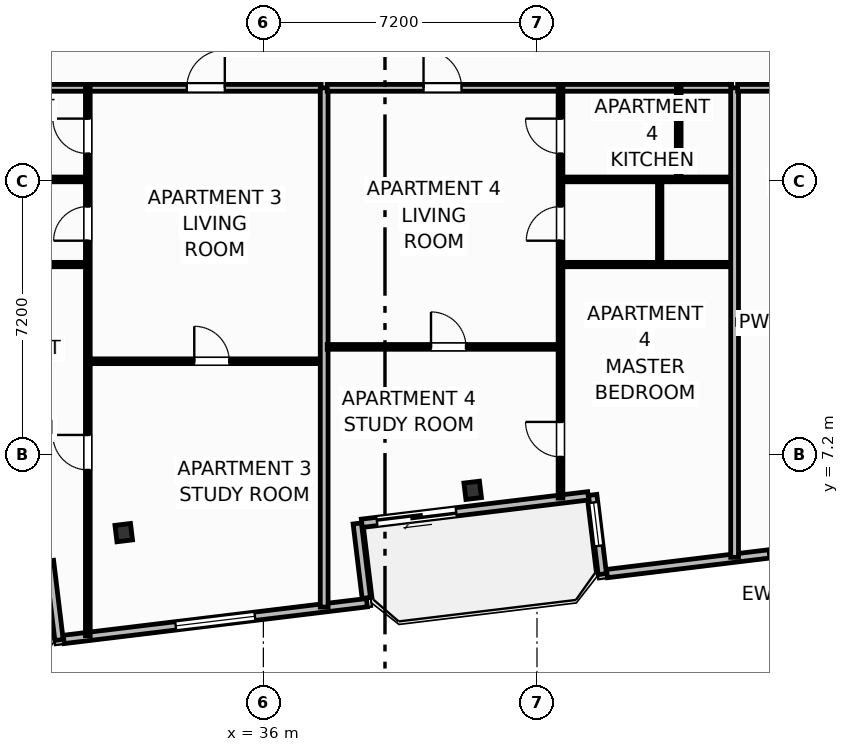
"""IFC4 building model, lengths in metres.
Left out: names, types, materials, properties, quantities, classifications, styles, units other than length and angle.
Written with IfcOpenShell. Run it as: python <this file> out.ifc"""

import sys

from ifc_helpers import new_model, si_unit, direction, frame, frame_2d, origin, origin_2d, place, context, subcontext, project, spatial, rectangle, i_section, extrude, element, fill, save


model = new_model("IFC4")
c1 = context("Model", 3, precision=1e-05, world=origin(), true_north=direction((0.0, 1.0)))
c2 = subcontext(c1, "Body", "Model", "MODEL_VIEW")
j1 = project(units=[si_unit("LENGTHUNIT", "METRE"), si_unit("PLANEANGLEUNIT", "RADIAN")], contexts=[c1])
p1 = place(None, origin())
s1 = spatial("IfcSite", under=j1, at=p1, CompositionType="ELEMENT")
p2 = place(p1, origin())
s2 = spatial("IfcBuilding", under=s1, at=p2, CompositionType="ELEMENT")
p3 = place(p2, frame((0.0, 0.0, 167.2)))
s3 = spatial("IfcBuildingStorey", under=s2, at=p3, CompositionType="ELEMENT", Elevation=167.2)
for number, where, z_axis, x_axis in (
    (1, (32.325, 5.146, 0.0), (0.0, 0.0, 1.0), (0.993, 0.12, 0.0)),
    (2, (41.508, 6.26, 0.0), (0.0, 0.0, 1.0), (0.993, 0.12, 0.0)),
):
    element("IfcColumn", number, at=place(p3, frame(where, z_axis=z_axis, x_axis=x_axis)), inside=s3, PredefinedType="COLUMN", context=c2, shape_type="SweptSolid", body=[
        extrude(i_section(OverallWidth=0.412, OverallDepth=0.435, WebThickness=0.036, FlangeThickness=0.057, FilletRadius=0.025, at=origin_2d()), origin(), (0.0, 0.0, 1.0), 3.7),
    ])
p4 = place(p3, frame((44.548, 6.114, 0.0), z_axis=(0.0, 0.0, 1.0), x_axis=(-0.992735402148, -0.120318000826, 0.0)))
e3 = element("IfcWall", 3, at=p4, inside=s3, PredefinedType="SOLIDWALL", context=c2, shape_type="SweptSolid", body=[
    extrude(rectangle(XDim=6.0, YDim=0.22, at=frame_2d((3.0, 0.0))), origin(), (0.0, 0.0, 1.0), 2.73),
])
p5 = place(p4, frame((3.5, 0.0, 0.0)))
e4 = element("IfcOpeningElement", 4, at=p5, cuts=e3, PredefinedType="OPENING", context=c2, shape_type="SweptSolid", body=[
    extrude(rectangle(XDim=2.1, YDim=2.3, at=frame_2d((1.05, 1.15))), frame((0.0, 0.12, 0.0), z_axis=(0.0, -1.0, 0.0), x_axis=(1.0, 0.0, 0.0)), (0.0, 0.0, 1.0), 0.24),
])
p6 = place(p3, frame((30.37, 4.406, 0.0), z_axis=(0.0, 0.0, 1.0), x_axis=(0.120327895535, -0.992734202874, 0.0)))
e5 = element("IfcWall", 5, at=p6, inside=s3, PredefinedType="SOLIDWALL", context=c2, shape_type="SweptSolid", body=[
    extrude(rectangle(XDim=2.1, YDim=0.22, at=frame_2d((1.05, 0.0))), origin(), (0.0, 0.0, 1.0), 2.73),
])
p7 = place(p3, frame((30.747, 2.336, 0.0), z_axis=(0.0, 0.0, 1.0), x_axis=(0.992731032022, 0.120354052946, 0.0)))
e6 = element("IfcWall", 6, at=p7, inside=s3, PredefinedType="SOLIDWALL", context=c2, shape_type="SweptSolid", body=[
    extrude(rectangle(XDim=8.035, YDim=0.22, at=frame_2d((4.018, 0.0))), origin(), (0.0, 0.0, 1.0), 2.73),
])
p8 = place(p7, frame((2.968, 0.0, 0.8)))
e7 = element("IfcOpeningElement", 7, at=p8, cuts=e6, PredefinedType="OPENING", context=c2, shape_type="SweptSolid", body=[
    extrude(rectangle(XDim=2.1, YDim=1.75, at=frame_2d((1.05, 0.875))), frame((0.0, 0.12, 0.0), z_axis=(0.0, -1.0, 0.0), x_axis=(1.0, 0.0, 0.0)), (0.0, 0.0, 1.0), 0.24),
])
p9 = place(p3, frame((38.709, 3.427, 0.0), z_axis=(0.0, 0.0, 1.0), x_axis=(-0.120397815541, 0.992725725472, 0.0)))
e8 = element("IfcWall", 8, at=p9, inside=s3, PredefinedType="SOLIDWALL", context=c2, shape_type="SweptSolid", body=[
    extrude(rectangle(XDim=1.975, YDim=0.22, at=frame_2d((0.988, 0.0))), origin(), (0.0, 0.0, 1.0), 2.73),
])
p10 = place(p3, frame((44.666, 6.138, 0.0), z_axis=(0.0, 0.0, 1.0), x_axis=(0.120327895535, -0.992734202874, 0.0)))
e9 = element("IfcWall", 9, at=p10, inside=s3, PredefinedType="SOLIDWALL", context=c2, shape_type="SweptSolid", body=[
    extrude(rectangle(XDim=2.1, YDim=0.22, at=frame_2d((1.05, 0.0))), origin(), (0.0, 0.0, 1.0), 2.73),
])
p11 = place(p10, frame((0.2, 0.0, 0.8)))
e10 = element("IfcOpeningElement", 10, at=p11, cuts=e9, PredefinedType="OPENING", context=c2, shape_type="SweptSolid", body=[
    extrude(rectangle(XDim=1.15, YDim=1.4, at=frame_2d((0.575, 0.7))), frame((0.0, 0.12, 0.0), z_axis=(0.0, -1.0, 0.0), x_axis=(1.0, 0.0, 0.0)), (0.0, 0.0, 1.0), 0.24),
])
p12 = place(p3, frame((45.042, 4.069, 0.0), z_axis=(0.0, 0.0, 1.0), x_axis=(0.992731032022, 0.120354052946, 0.0)))
e11 = element("IfcWall", 11, at=p12, inside=s3, PredefinedType="SOLIDWALL", context=c2, shape_type="SweptSolid", body=[
    extrude(rectangle(XDim=8.035, YDim=0.22, at=frame_2d((4.018, 0.0))), origin(), (0.0, 0.0, 1.0), 2.73),
])
p13 = place(p12, frame((4.273, 0.0, 0.8)))
e12 = element("IfcOpeningElement", 12, at=p13, cuts=e11, PredefinedType="OPENING", context=c2, shape_type="SweptSolid", body=[
    extrude(rectangle(XDim=2.1, YDim=1.75, at=frame_2d((1.05, 0.875))), frame((0.0, 0.12, 0.0), z_axis=(0.0, -1.0, 0.0), x_axis=(1.0, 0.0, 0.0)), (0.0, 0.0, 1.0), 0.24),
])
p14 = place(p3, frame((31.451, 9.656, 0.0), z_axis=(0.0, 0.0, 1.0), x_axis=(1.0, 0.0, 0.0)))
e13 = element("IfcWall", 13, at=p14, inside=s3, PredefinedType="PARTITIONING", context=c2, shape_type="SweptSolid", body=[
    extrude(rectangle(XDim=6.069, YDim=0.125, at=frame_2d((3.035, 0.0))), origin(), (0.0, 0.0, 1.0), 3.45),
])
p15 = place(p14, frame((2.731, 0.0, 0.0)))
e14 = element("IfcOpeningElement", 14, at=p15, cuts=e13, PredefinedType="OPENING", context=c2, shape_type="SweptSolid", body=[
    extrude(rectangle(XDim=0.92, YDim=2.05, at=frame_2d((0.46, 1.025))), frame((0.0, 0.073, 0.0), z_axis=(0.0, -1.0, 0.0), x_axis=(1.0, 0.0, 0.0)), (0.0, 0.0, 1.0), 0.145),
])
p16 = place(p3, frame((26.88, 16.85, 0.0), z_axis=(0.0, 0.0, 1.0), x_axis=(1.0, 0.0, 0.0)))
e15 = element("IfcWall", 15, at=p16, inside=s3, PredefinedType="PARTITIONING", context=c2, shape_type="SweptSolid", body=[
    extrude(rectangle(XDim=10.64, YDim=0.18, at=frame_2d((5.32, 0.0))), origin(), (0.0, 0.0, 1.0), 3.45),
])
p17 = place(p16, frame((7.105, 0.0, 0.0)))
e16 = element("IfcOpeningElement", 16, at=p17, cuts=e15, PredefinedType="OPENING", context=c2, shape_type="SweptSolid", body=[
    extrude(rectangle(XDim=1.0, YDim=2.2, at=frame_2d((0.5, 1.1))), frame((0.0, 0.1, 0.0), z_axis=(0.0, -1.0, 0.0), x_axis=(1.0, 0.0, 0.0)), (0.0, 0.0, 1.0), 0.2),
])
p18 = place(p3, frame((31.381, 2.433, 0.0), z_axis=(0.0, 0.0, 1.0), x_axis=(0.0, 1.0, 0.0)))
e17 = element("IfcWall", 17, at=p18, inside=s3, PredefinedType="PARTITIONING", context=c2, shape_type="SweptSolid", body=[
    extrude(rectangle(XDim=14.417, YDim=0.125, at=frame_2d((7.208, 0.0))), origin(), (0.0, 0.0, 1.0), 3.45),
])
p19 = place(p18, frame((4.364, 0.0, 0.0)))
e18 = element("IfcOpeningElement", 18, at=p19, cuts=e17, PredefinedType="OPENING", context=c2, shape_type="SweptSolid", body=[
    extrude(rectangle(XDim=0.92, YDim=2.05, at=frame_2d((0.46, 1.025))), frame((0.0, 0.073, 0.0), z_axis=(0.0, -1.0, 0.0), x_axis=(1.0, 0.0, 0.0)), (0.0, 0.0, 1.0), 0.145),
])
p20 = place(p18, frame((10.395, 0.0, 0.0)))
e19 = element("IfcOpeningElement", 19, at=p20, cuts=e17, PredefinedType="OPENING", context=c2, shape_type="SweptSolid", body=[
    extrude(rectangle(XDim=0.9, YDim=2.05, at=frame_2d((0.45, 1.025))), frame((0.0, 0.073, 0.0), z_axis=(0.0, -1.0, 0.0), x_axis=(1.0, 0.0, 0.0)), (0.0, 0.0, 1.0), 0.145),
])
p21 = place(p18, frame((12.687, 0.0, 0.0)))
e20 = element("IfcOpeningElement", 20, at=p21, cuts=e17, PredefinedType="OPENING", context=c2, shape_type="SweptSolid", body=[
    extrude(rectangle(XDim=0.92, YDim=2.05, at=frame_2d((0.46, 1.025))), frame((0.0, 0.073, 0.0), z_axis=(0.0, -1.0, 0.0), x_axis=(1.0, 0.0, 0.0)), (0.0, 0.0, 1.0), 0.145),
])
p22 = place(p3, frame((26.88, 14.44, 0.0), z_axis=(0.0, 0.0, 1.0), x_axis=(1.0, 0.0, 0.0)))
e21 = element("IfcWall", 21, at=p22, inside=s3, PredefinedType="PARTITIONING", context=c2, shape_type="SweptSolid", body=[
    extrude(rectangle(XDim=4.431, YDim=0.125, at=frame_2d((2.215, 0.0))), origin(), (0.0, 0.0, 1.0), 3.45),
])
p23 = place(p3, frame((26.88, 12.2, 0.0), z_axis=(0.0, 0.0, 1.0), x_axis=(1.0, 0.0, 0.0)))
e22 = element("IfcWall", 22, at=p23, inside=s3, PredefinedType="PARTITIONING", context=c2, shape_type="SweptSolid", body=[
    extrude(rectangle(XDim=4.431, YDim=0.115, at=frame_2d((2.215, 0.0))), origin(), (0.0, 0.0, 1.0), 3.45),
])
p24 = place(p3, frame((37.6, 3.187, 0.0), z_axis=(0.0, 0.0, 1.0), x_axis=(0.0, 1.0, 0.0)))
e23 = element("IfcWall", 23, at=p24, inside=s3, PredefinedType="PARTITIONING", context=c2, shape_type="SweptSolid", body=[
    extrude(rectangle(XDim=13.663, YDim=0.205, at=frame_2d((6.832, 0.0))), origin(), (0.0, 0.0, 1.0), 3.45),
])
p25 = place(p3, frame((37.68, 10.033, 0.0), z_axis=(0.0, 0.0, 1.0), x_axis=(1.0, 0.0, 0.0)))
e24 = element("IfcWall", 24, at=p25, inside=s3, PredefinedType="PARTITIONING", context=c2, shape_type="SweptSolid", body=[
    extrude(rectangle(XDim=6.069, YDim=0.125, at=frame_2d((3.035, 0.0))), origin(), (0.0, 0.0, 1.0), 3.45),
])
p26 = place(p25, frame((2.731, 0.0, 0.0)))
e25 = element("IfcOpeningElement", 25, at=p26, cuts=e24, PredefinedType="OPENING", context=c2, shape_type="SweptSolid", body=[
    extrude(rectangle(XDim=0.92, YDim=2.05, at=frame_2d((0.46, 1.025))), frame((0.0, 0.073, 0.0), z_axis=(0.0, -1.0, 0.0), x_axis=(1.0, 0.0, 0.0)), (0.0, 0.0, 1.0), 0.145),
])
p27 = place(p3, frame((37.68, 16.85, 0.0), z_axis=(0.0, 0.0, 1.0), x_axis=(1.0, 0.0, 0.0)))
e26 = element("IfcWall", 26, at=p27, inside=s3, PredefinedType="PARTITIONING", context=c2, shape_type="SweptSolid", body=[
    extrude(rectangle(XDim=10.64, YDim=0.18, at=frame_2d((5.32, 0.0))), origin(), (0.0, 0.0, 1.0), 3.45),
])
p28 = place(p27, frame((2.535, 0.0, 0.0)))
e27 = element("IfcOpeningElement", 27, at=p28, cuts=e26, PredefinedType="OPENING", context=c2, shape_type="SweptSolid", body=[
    extrude(rectangle(XDim=1.0, YDim=2.2, at=frame_2d((0.5, 1.1))), frame((0.0, 0.1, 0.0), z_axis=(0.0, -1.0, 0.0), x_axis=(1.0, 0.0, 0.0)), (0.0, 0.0, 1.0), 0.2),
])
p29 = place(p3, frame((43.819, 6.056, 0.0), z_axis=(0.0, 0.0, 1.0), x_axis=(0.0, 1.0, 0.0)))
e28 = element("IfcWall", 28, at=p29, inside=s3, PredefinedType="PARTITIONING", context=c2, shape_type="SweptSolid", body=[
    extrude(rectangle(XDim=10.794, YDim=0.125, at=frame_2d((5.397, 0.0))), origin(), (0.0, 0.0, 1.0), 2.662),
])
p30 = place(p29, frame((1.083, 0.0, 0.0)))
e29 = element("IfcOpeningElement", 29, at=p30, cuts=e28, PredefinedType="OPENING", context=c2, shape_type="SweptSolid", body=[
    extrude(rectangle(XDim=0.92, YDim=2.05, at=frame_2d((0.46, 1.025))), frame((0.0, 0.073, 0.0), z_axis=(0.0, -1.0, 0.0), x_axis=(1.0, 0.0, 0.0)), (0.0, 0.0, 1.0), 0.145),
])
p31 = place(p29, frame((6.771, 0.0, 0.0)))
e30 = element("IfcOpeningElement", 30, at=p31, cuts=e28, PredefinedType="OPENING", context=c2, shape_type="SweptSolid", body=[
    extrude(rectangle(XDim=0.9, YDim=2.05, at=frame_2d((0.45, 1.025))), frame((0.0, 0.073, 0.0), z_axis=(0.0, -1.0, 0.0), x_axis=(1.0, 0.0, 0.0)), (0.0, 0.0, 1.0), 0.145),
])
p32 = place(p29, frame((9.064, 0.0, 0.0)))
e31 = element("IfcOpeningElement", 31, at=p32, cuts=e28, PredefinedType="OPENING", context=c2, shape_type="SweptSolid", body=[
    extrude(rectangle(XDim=0.92, YDim=2.05, at=frame_2d((0.46, 1.025))), frame((0.0, 0.073, 0.0), z_axis=(0.0, -1.0, 0.0), x_axis=(1.0, 0.0, 0.0)), (0.0, 0.0, 1.0), 0.145),
])
p33 = place(p3, frame((43.889, 14.44, 0.0), z_axis=(0.0, 0.0, 1.0), x_axis=(1.0, 0.0, 0.0)))
e32 = element("IfcWall", 32, at=p33, inside=s3, PredefinedType="PARTITIONING", context=c2, shape_type="SweptSolid", body=[
    extrude(rectangle(XDim=4.431, YDim=0.125, at=frame_2d((2.215, 0.0))), origin(), (0.0, 0.0, 1.0), 3.45),
])
p34 = place(p3, frame((43.889, 12.2, 0.0), z_axis=(0.0, 0.0, 1.0), x_axis=(1.0, 0.0, 0.0)))
e33 = element("IfcWall", 33, at=p34, inside=s3, PredefinedType="PARTITIONING", context=c2, shape_type="SweptSolid", body=[
    extrude(rectangle(XDim=4.431, YDim=0.115, at=frame_2d((2.215, 0.0))), origin(), (0.0, 0.0, 1.0), 3.45),
])
p35 = place(p3, frame((46.929, 14.44, 0.0), z_axis=(0.0, 0.0, 1.0), x_axis=(0.0, 1.0, 0.0)))
e34 = element("IfcWall", 34, at=p35, inside=s3, PredefinedType="PARTITIONING", context=c2, shape_type="SweptSolid", body=[
    extrude(rectangle(XDim=2.41, YDim=0.125, at=frame_2d((1.205, 0.0))), origin(), (0.0, 0.0, 1.0), 3.45),
])
p36 = place(p3, frame((46.429, 12.2, 0.0), z_axis=(0.0, 0.0, 1.0), x_axis=(0.0, 1.0, 0.0)))
e35 = element("IfcWall", 35, at=p36, inside=s3, PredefinedType="PARTITIONING", context=c2, shape_type="SweptSolid", body=[
    extrude(rectangle(XDim=2.24, YDim=0.115, at=frame_2d((1.12, 0.0))), origin(), (0.0, 0.0, 1.0), 3.45),
])
p37 = place(p3, frame((48.4, 4.496, 0.0), z_axis=(0.0, 0.0, 1.0), x_axis=(0.0, 1.0, 0.0)))
e36 = element("IfcWall", 36, at=p37, inside=s3, PredefinedType="PARTITIONING", context=c2, shape_type="SweptSolid", body=[
    extrude(rectangle(XDim=12.354, YDim=0.205, at=frame_2d((6.177, 0.0))), origin(), (0.0, 0.0, 1.0), 3.45),
])
p38 = place(p3, frame((48.48, 10.688, 0.0), z_axis=(0.0, 0.0, 1.0), x_axis=(1.0, 0.0, 0.0)))
e37 = element("IfcWall", 37, at=p38, inside=s3, PredefinedType="PARTITIONING", context=c2, shape_type="SweptSolid", body=[
    extrude(rectangle(XDim=6.069, YDim=0.125, at=frame_2d((3.035, 0.0))), origin(), (0.0, 0.0, 1.0), 3.45),
])
p39 = place(p38, frame((2.731, 0.0, 0.0)))
e38 = element("IfcOpeningElement", 38, at=p39, cuts=e37, PredefinedType="OPENING", context=c2, shape_type="SweptSolid", body=[
    extrude(rectangle(XDim=0.92, YDim=2.05, at=frame_2d((0.46, 1.025))), frame((0.0, 0.073, 0.0), z_axis=(0.0, -1.0, 0.0), x_axis=(1.0, 0.0, 0.0)), (0.0, 0.0, 1.0), 0.145),
])
p40 = place(p3, frame((48.48, 16.85, 0.0), z_axis=(0.0, 0.0, 1.0), x_axis=(1.0, 0.0, 0.0)))
e39 = element("IfcWall", 39, at=p40, inside=s3, PredefinedType="PARTITIONING", context=c2, shape_type="SweptSolid", body=[
    extrude(rectangle(XDim=10.64, YDim=0.18, at=frame_2d((5.32, 0.0))), origin(), (0.0, 0.0, 1.0), 3.45),
])
p41 = place(p40, frame((2.535, 0.0, 0.0)))
e40 = element("IfcOpeningElement", 40, at=p41, cuts=e39, PredefinedType="OPENING", context=c2, shape_type="SweptSolid", body=[
    extrude(rectangle(XDim=1.0, YDim=2.2, at=frame_2d((0.5, 1.1))), frame((0.0, 0.1, 0.0), z_axis=(0.0, -1.0, 0.0), x_axis=(1.0, 0.0, 0.0)), (0.0, 0.0, 1.0), 0.2),
])
p42 = place(p5, origin())
e41 = element("IfcDoor", 41, at=p42, inside=s3, OperationType="SLIDING_TO_LEFT", PredefinedType="DOOR", context=c2, shape_type="SweptSolid", body=[
    extrude(rectangle(XDim=2.1, YDim=2.3, at=frame_2d((1.05, 1.15))), frame((0.0, 0.025, 0.0), z_axis=(0.0, -1.0, 0.0), x_axis=(1.0, 0.0, 0.0)), (0.0, 0.0, 1.0), 0.05),
])
fill(e4, e41)
p43 = place(p8, origin())
e42 = element("IfcWindow", 42, at=p43, inside=s3, PartitioningType="SINGLE_PANEL", PredefinedType="WINDOW", context=c2, shape_type="SweptSolid", body=[
    extrude(rectangle(XDim=2.1, YDim=1.75, at=frame_2d((1.05, 0.875))), frame((0.0, 0.03, 0.0), z_axis=(0.0, -1.0, 0.0), x_axis=(1.0, 0.0, 0.0)), (0.0, 0.0, 1.0), 0.06),
])
fill(e7, e42)
p44 = place(p13, origin())
e43 = element("IfcWindow", 43, at=p44, inside=s3, PartitioningType="SINGLE_PANEL", PredefinedType="WINDOW", context=c2, shape_type="SweptSolid", body=[
    extrude(rectangle(XDim=2.1, YDim=1.75, at=frame_2d((1.05, 0.875))), frame((0.0, 0.03, 0.0), z_axis=(0.0, -1.0, 0.0), x_axis=(1.0, 0.0, 0.0)), (0.0, 0.0, 1.0), 0.06),
])
fill(e12, e43)
p45 = place(p15, origin())
e44 = element("IfcDoor", 44, at=p45, inside=s3, OperationType="SINGLE_SWING_LEFT", PredefinedType="DOOR", context=c2, shape_type="SweptSolid", body=[
    extrude(rectangle(XDim=0.92, YDim=2.05, at=frame_2d((0.46, 1.025))), frame((0.0, 0.025, 0.0), z_axis=(0.0, -1.0, 0.0), x_axis=(1.0, 0.0, 0.0)), (0.0, 0.0, 1.0), 0.05),
])
fill(e14, e44)
p46 = place(p17, origin())
e45 = element("IfcDoor", 45, at=p46, inside=s3, OperationType="SINGLE_SWING_RIGHT", PredefinedType="DOOR", context=c2, shape_type="SweptSolid", body=[
    extrude(rectangle(XDim=1.0, YDim=2.2, at=frame_2d((0.5, 1.1))), frame((0.0, 0.025, 0.0), z_axis=(0.0, -1.0, 0.0), x_axis=(1.0, 0.0, 0.0)), (0.0, 0.0, 1.0), 0.05),
])
fill(e16, e45)
p47 = place(p19, origin())
e46 = element("IfcDoor", 46, at=p47, inside=s3, OperationType="SINGLE_SWING_RIGHT", PredefinedType="DOOR", context=c2, shape_type="SweptSolid", body=[
    extrude(rectangle(XDim=0.92, YDim=2.05, at=frame_2d((0.46, 1.025))), frame((0.0, 0.025, 0.0), z_axis=(0.0, -1.0, 0.0), x_axis=(1.0, 0.0, 0.0)), (0.0, 0.0, 1.0), 0.05),
])
fill(e18, e46)
p48 = place(p20, origin())
e47 = element("IfcDoor", 47, at=p48, inside=s3, OperationType="SINGLE_SWING_LEFT", PredefinedType="DOOR", context=c2, shape_type="SweptSolid", body=[
    extrude(rectangle(XDim=0.9, YDim=2.05, at=frame_2d((0.45, 1.025))), frame((0.0, 0.025, 0.0), z_axis=(0.0, -1.0, 0.0), x_axis=(1.0, 0.0, 0.0)), (0.0, 0.0, 1.0), 0.05),
])
fill(e19, e47)
p49 = place(p21, origin())
e48 = element("IfcDoor", 48, at=p49, inside=s3, OperationType="SINGLE_SWING_RIGHT", PredefinedType="DOOR", context=c2, shape_type="SweptSolid", body=[
    extrude(rectangle(XDim=0.92, YDim=2.05, at=frame_2d((0.46, 1.025))), frame((0.0, 0.025, 0.0), z_axis=(0.0, -1.0, 0.0), x_axis=(1.0, 0.0, 0.0)), (0.0, 0.0, 1.0), 0.05),
])
fill(e20, e48)
p50 = place(p26, origin())
e49 = element("IfcDoor", 49, at=p50, inside=s3, OperationType="SINGLE_SWING_LEFT", PredefinedType="DOOR", context=c2, shape_type="SweptSolid", body=[
    extrude(rectangle(XDim=0.92, YDim=2.05, at=frame_2d((0.46, 1.025))), frame((0.0, 0.025, 0.0), z_axis=(0.0, -1.0, 0.0), x_axis=(1.0, 0.0, 0.0)), (0.0, 0.0, 1.0), 0.05),
])
fill(e25, e49)
p51 = place(p28, origin())
e50 = element("IfcDoor", 50, at=p51, inside=s3, OperationType="SINGLE_SWING_LEFT", PredefinedType="DOOR", context=c2, shape_type="SweptSolid", body=[
    extrude(rectangle(XDim=1.0, YDim=2.2, at=frame_2d((0.5, 1.1))), frame((0.0, 0.025, 0.0), z_axis=(0.0, -1.0, 0.0), x_axis=(1.0, 0.0, 0.0)), (0.0, 0.0, 1.0), 0.05),
])
fill(e27, e50)
p52 = place(p30, origin())
e51 = element("IfcDoor", 51, at=p52, inside=s3, OperationType="SINGLE_SWING_RIGHT", PredefinedType="DOOR", context=c2, shape_type="SweptSolid", body=[
    extrude(rectangle(XDim=0.92, YDim=2.05, at=frame_2d((0.46, 1.025))), frame((0.0, 0.025, 0.0), z_axis=(0.0, -1.0, 0.0), x_axis=(1.0, 0.0, 0.0)), (0.0, 0.0, 1.0), 0.05),
])
fill(e29, e51)
p53 = place(p31, origin())
e52 = element("IfcDoor", 52, at=p53, inside=s3, OperationType="SINGLE_SWING_LEFT", PredefinedType="DOOR", context=c2, shape_type="SweptSolid", body=[
    extrude(rectangle(XDim=0.9, YDim=2.05, at=frame_2d((0.45, 1.025))), frame((0.0, 0.025, 0.0), z_axis=(0.0, -1.0, 0.0), x_axis=(1.0, 0.0, 0.0)), (0.0, 0.0, 1.0), 0.05),
])
fill(e30, e52)
p54 = place(p32, origin())
e53 = element("IfcDoor", 53, at=p54, inside=s3, OperationType="SINGLE_SWING_RIGHT", PredefinedType="DOOR", context=c2, shape_type="SweptSolid", body=[
    extrude(rectangle(XDim=0.92, YDim=2.05, at=frame_2d((0.46, 1.025))), frame((0.0, 0.025, 0.0), z_axis=(0.0, -1.0, 0.0), x_axis=(1.0, 0.0, 0.0)), (0.0, 0.0, 1.0), 0.05),
])
fill(e31, e53)
p55 = place(p11, origin())
e54 = element("IfcWindow", 54, at=p55, inside=s3, PartitioningType="SINGLE_PANEL", PredefinedType="WINDOW", context=c2, shape_type="SweptSolid", body=[
    extrude(rectangle(XDim=1.15, YDim=1.4, at=frame_2d((0.575, 0.7))), frame((0.0, 0.03, 0.0), z_axis=(0.0, -1.0, 0.0), x_axis=(1.0, 0.0, 0.0)), (0.0, 0.0, 1.0), 0.06),
])
fill(e10, e54)
save(model, sys.argv[1])
